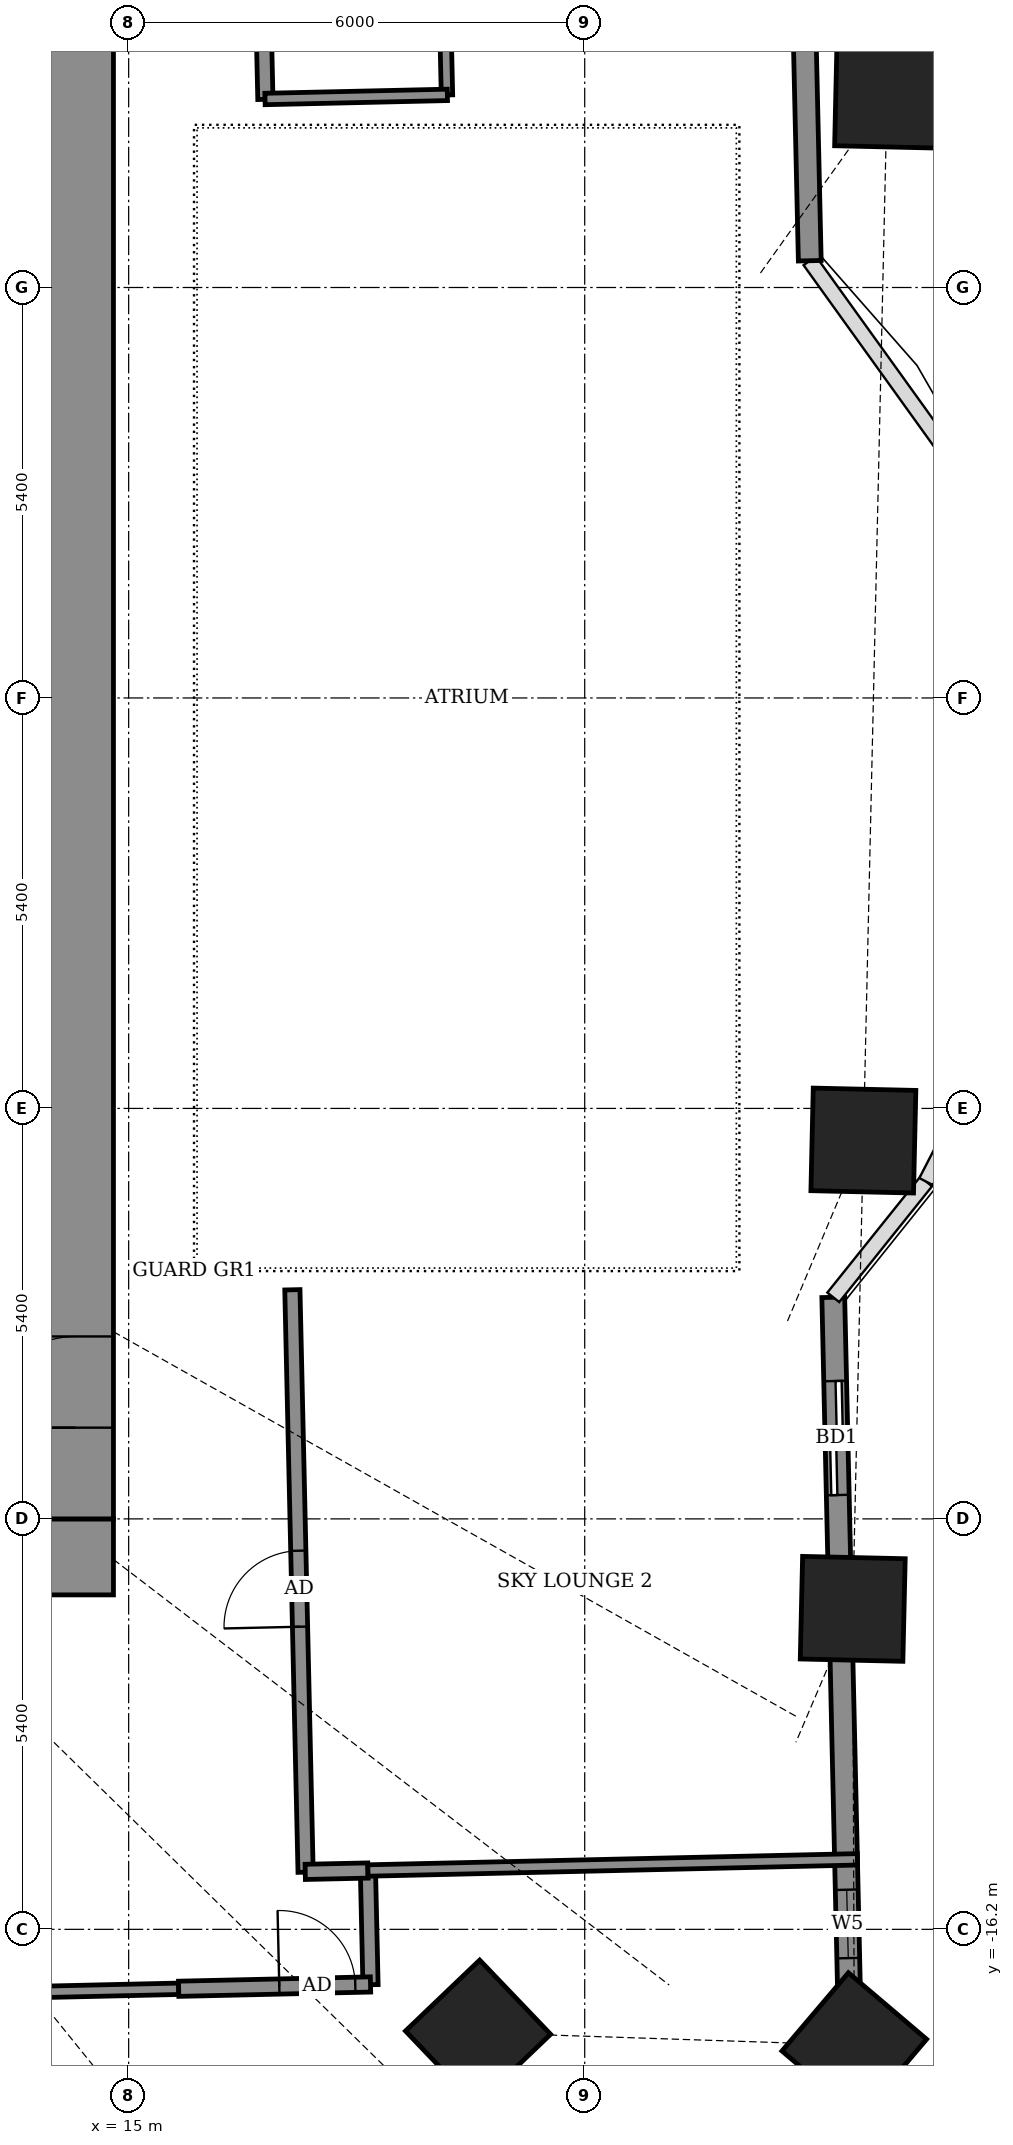
"""IFC4 building model, lengths in metres.
Left out: names, types, materials, properties, quantities, classifications, styles, units other than length and angle.
Written with IfcOpenShell. Run it as: python <this file> out.ifc"""

import sys

from ifc_helpers import new_model, si_unit, direction, frame, frame_2d, origin, origin_2d, place, context, subcontext, project, spatial, rectangle, extrude, element, fill, save


model = new_model("IFC4")
c1 = context("Model", 3, precision=1e-05, world=origin(), true_north=direction((0.0, 1.0)))
c2 = subcontext(c1, "Body", "Model", "MODEL_VIEW")
j1 = project(units=[si_unit("LENGTHUNIT", "METRE"), si_unit("PLANEANGLEUNIT", "RADIAN")], contexts=[c1])
p1 = place(None, origin())
s1 = spatial("IfcSite", under=j1, at=p1, CompositionType="ELEMENT")
p2 = place(p1, origin())
s2 = spatial("IfcBuilding", under=s1, at=p2, CompositionType="ELEMENT")
p3 = place(p2, frame((0.0, 0.0, 125.5)))
s3 = spatial("IfcBuildingStorey", under=s2, at=p3, CompositionType="ELEMENT", Elevation=125.5)
for number, where, z_axis, x_axis in (
    (1, (19.597, -17.559, -0.55), (0.0, 0.0, 1.0), (0.723, 0.691, 0.0)),
    (2, (24.547, -17.723, -0.55), (0.0, 0.0, 1.0), (0.647, 0.762, 0.0)),
    (3, (24.526, -11.984, -0.55), (0.0, 0.0, 1.0), (0.023, 1.0, 0.0)),
    (4, (24.666, -5.823, -0.55), (0.0, 0.0, 1.0), (0.023, 1.0, 0.0)),
    (5, (24.978, 7.924, -0.55), (0.0, 0.0, 1.0), (0.023, 1.0, 0.0)),
):
    element("IfcColumn", number, at=place(p3, frame(where, z_axis=z_axis, x_axis=x_axis)), inside=s3, PredefinedType="COLUMN", context=c2, shape_type="SweptSolid", body=[
        extrude(rectangle(XDim=1.35, YDim=1.35, at=origin_2d()), origin(), (0.0, 0.0, 1.0), 4.6),
    ])
p4 = place(p3, frame((24.518, -18.812, 0.0), z_axis=(0.0, 0.0, 1.0), x_axis=(-0.02269451316, 0.999742446369, 0.0)))
e6 = element("IfcWall", 6, at=p4, inside=s3, PredefinedType="SOLIDWALL", context=c2, shape_type="SweptSolid", body=[
    extrude(rectangle(XDim=10.93, YDim=0.3, at=frame_2d((5.465, 0.0))), origin(), (0.0, 0.0, 1.0), 2.65),
])
p5 = place(p4, frame((2.234, 0.0, 0.9)))
e7 = element("IfcOpeningElement", 7, at=p5, cuts=e6, PredefinedType="OPENING", context=c2, shape_type="SweptSolid", body=[
    extrude(rectangle(XDim=0.9, YDim=1.5, at=frame_2d((0.45, 0.75))), frame((0.0, 0.16, 0.0), z_axis=(0.0, -1.0, 0.0), x_axis=(1.0, 0.0, 0.0)), (0.0, 0.0, 1.0), 0.32),
])
p6 = place(p4, frame((8.328, 0.0, 0.0)))
e8 = element("IfcOpeningElement", 8, at=p6, cuts=e6, PredefinedType="OPENING", context=c2, shape_type="SweptSolid", body=[
    extrude(rectangle(XDim=1.5, YDim=2.4, at=frame_2d((0.75, 1.2))), frame((0.0, 0.16, 0.0), z_axis=(0.0, -1.0, 0.0), x_axis=(1.0, 0.0, 0.0)), (0.0, 0.0, 1.0), 0.32),
])
p7 = place(p3, frame((23.961, 5.752, 0.0), z_axis=(0.0, 0.0, 1.0), x_axis=(-0.022715362207, 0.999741972871, 0.0)))
e9 = element("IfcWall", 9, at=p7, inside=s3, PredefinedType="SOLIDWALL", context=c2, shape_type="SweptSolid", body=[
    extrude(rectangle(XDim=11.93, YDim=0.3, at=frame_2d((5.965, 0.0))), origin(), (0.0, 0.0, 1.0), 2.75),
])
p8 = place(p7, frame((4.216, 0.0, 0.0)))
e10 = element("IfcOpeningElement", 10, at=p8, cuts=e9, PredefinedType="OPENING", context=c2, shape_type="SweptSolid", body=[
    extrude(rectangle(XDim=1.5, YDim=2.4, at=frame_2d((0.75, 1.2))), frame((0.0, 0.16, 0.0), z_axis=(0.0, -1.0, 0.0), x_axis=(1.0, 0.0, 0.0)), (0.0, 0.0, 1.0), 0.32),
])
p9 = place(p7, frame((10.094, 0.0, 0.9)))
e11 = element("IfcOpeningElement", 11, at=p9, cuts=e9, PredefinedType="OPENING", context=c2, shape_type="SweptSolid", body=[
    extrude(rectangle(XDim=1.2, YDim=1.5, at=frame_2d((0.6, 0.75))), frame((0.0, 0.16, 0.0), z_axis=(0.0, -1.0, 0.0), x_axis=(1.0, 0.0, 0.0)), (0.0, 0.0, 1.0), 0.32),
])
p10 = place(p3, frame((18.182, -16.929, 0.0), z_axis=(0.0, 0.0, 1.0), x_axis=(-0.022632637625, 0.99974384905, 0.0)))
e12 = element("IfcWall", 12, at=p10, inside=s3, PredefinedType="PARTITIONING", context=c2, shape_type="SweptSolid", body=[
    extrude(rectangle(XDim=1.5, YDim=0.2, at=frame_2d((0.75, 0.0))), origin(), (0.0, 0.0, 1.0), 2.85),
])
p11 = place(p3, frame((-14.871, -17.675, 0.0), z_axis=(0.0, 0.0, 1.0), x_axis=(0.999742359486, 0.02269834024, 0.0)))
e13 = element("IfcWall", 13, at=p11, inside=s3, PredefinedType="PARTITIONING", context=c2, shape_type="SweptSolid", body=[
    extrude(rectangle(XDim=30.536, YDim=0.15, at=frame_2d((15.268, 0.0))), origin(), (0.0, 0.0, 1.0), 2.75),
])
p12 = place(p11, frame((0.784, 0.0, 0.0)))
e14 = element("IfcOpeningElement", 14, at=p12, cuts=e13, PredefinedType="OPENING", context=c2, shape_type="SweptSolid", body=[
    extrude(rectangle(XDim=1.0, YDim=2.1, at=frame_2d((0.5, 1.05))), frame((0.0, 0.085, 0.0), z_axis=(0.0, -1.0, 0.0), x_axis=(1.0, 0.0, 0.0)), (0.0, 0.0, 1.0), 0.17),
])
p13 = place(p11, frame((3.934, 0.0, 0.0)))
e15 = element("IfcOpeningElement", 15, at=p13, cuts=e13, PredefinedType="OPENING", context=c2, shape_type="SweptSolid", body=[
    extrude(rectangle(XDim=0.9, YDim=2.1, at=frame_2d((0.45, 1.05))), frame((0.0, 0.085, 0.0), z_axis=(0.0, -1.0, 0.0), x_axis=(1.0, 0.0, 0.0)), (0.0, 0.0, 1.0), 0.17),
])
p14 = place(p11, frame((11.384, 0.0, 0.0)))
e16 = element("IfcOpeningElement", 16, at=p14, cuts=e13, PredefinedType="OPENING", context=c2, shape_type="SweptSolid", body=[
    extrude(rectangle(XDim=0.9, YDim=2.1, at=frame_2d((0.45, 1.05))), frame((0.0, 0.085, 0.0), z_axis=(0.0, -1.0, 0.0), x_axis=(1.0, 0.0, 0.0)), (0.0, 0.0, 1.0), 0.17),
])
p15 = place(p11, frame((15.334, 0.0, 0.0)))
e17 = element("IfcOpeningElement", 17, at=p15, cuts=e13, PredefinedType="OPENING", context=c2, shape_type="SweptSolid", body=[
    extrude(rectangle(XDim=1.0, YDim=2.1, at=frame_2d((0.5, 1.05))), frame((0.0, 0.085, 0.0), z_axis=(0.0, -1.0, 0.0), x_axis=(1.0, 0.0, 0.0)), (0.0, 0.0, 1.0), 0.17),
])
p16 = place(p11, frame((19.259, 0.0, 0.0)))
e18 = element("IfcOpeningElement", 18, at=p16, cuts=e13, PredefinedType="OPENING", context=c2, shape_type="SweptSolid", body=[
    extrude(rectangle(XDim=0.9, YDim=2.1, at=frame_2d((0.45, 1.05))), frame((0.0, 0.085, 0.0), z_axis=(0.0, -1.0, 0.0), x_axis=(1.0, 0.0, 0.0)), (0.0, 0.0, 1.0), 0.17),
])
p17 = place(p11, frame((23.984, 0.0, 0.0)))
e19 = element("IfcOpeningElement", 19, at=p17, cuts=e13, PredefinedType="OPENING", context=c2, shape_type="SweptSolid", body=[
    extrude(rectangle(XDim=1.0, YDim=2.1, at=frame_2d((0.5, 1.05))), frame((0.0, 0.085, 0.0), z_axis=(0.0, -1.0, 0.0), x_axis=(1.0, 0.0, 0.0)), (0.0, 0.0, 1.0), 0.17),
])
p18 = place(p11, frame((21.659, 0.0, 0.0)))
e20 = element("IfcOpeningElement", 20, at=p18, cuts=e13, PredefinedType="OPENING", context=c2, shape_type="SweptSolid", body=[
    extrude(rectangle(XDim=0.9, YDim=2.1, at=frame_2d((0.45, 1.05))), frame((0.0, 0.085, 0.0), z_axis=(0.0, -1.0, 0.0), x_axis=(1.0, 0.0, 0.0)), (0.0, 0.0, 1.0), 0.17),
])
p19 = place(p11, frame((26.409, 0.0, 0.0)))
e21 = element("IfcOpeningElement", 21, at=p19, cuts=e13, PredefinedType="OPENING", context=c2, shape_type="SweptSolid", body=[
    extrude(rectangle(XDim=0.9, YDim=2.1, at=frame_2d((0.45, 1.05))), frame((0.0, 0.085, 0.0), z_axis=(0.0, -1.0, 0.0), x_axis=(1.0, 0.0, 0.0)), (0.0, 0.0, 1.0), 0.17),
])
p20 = place(p3, frame((15.658, -16.982, 0.0), z_axis=(0.0, 0.0, 1.0), x_axis=(0.9997461113, 0.022532486354, 0.0)))
e22 = element("IfcWall", 22, at=p20, inside=s3, PredefinedType="PARTITIONING", context=c2, shape_type="SweptSolid", body=[
    extrude(rectangle(XDim=2.525, YDim=0.2, at=frame_2d((1.262, 0.0))), origin(), (0.0, 0.0, 1.0), 2.85),
])
p21 = place(p20, frame((1.324, 0.0, 0.0)))
e23 = element("IfcOpeningElement", 23, at=p21, cuts=e22, PredefinedType="OPENING", context=c2, shape_type="SweptSolid", body=[
    extrude(rectangle(XDim=1.0, YDim=2.1, at=frame_2d((0.5, 1.05))), frame((0.0, 0.11, 0.0), z_axis=(0.0, -1.0, 0.0), x_axis=(1.0, 0.0, 0.0)), (0.0, 0.0, 1.0), 0.22),
])
p22 = place(p3, frame((17.328, -15.448, 0.0), z_axis=(0.0, 0.0, 1.0), x_axis=(-0.022680883318, 0.999742755679, 0.0)))
e24 = element("IfcWall", 24, at=p22, inside=s3, PredefinedType="PARTITIONING", context=c2, shape_type="SweptSolid", body=[
    extrude(rectangle(XDim=7.664, YDim=0.2, at=frame_2d((3.832, 0.0))), origin(), (0.0, 0.0, 1.0), 2.85),
])
p23 = place(p22, frame((3.23, 0.0, 0.0)))
e25 = element("IfcOpeningElement", 25, at=p23, cuts=e24, PredefinedType="OPENING", context=c2, shape_type="SweptSolid", body=[
    extrude(rectangle(XDim=1.0, YDim=2.1, at=frame_2d((0.5, 1.05))), frame((0.0, 0.11, 0.0), z_axis=(0.0, -1.0, 0.0), x_axis=(1.0, 0.0, 0.0)), (0.0, 0.0, 1.0), 0.22),
])
p24 = place(p3, frame((17.323, -15.444, 0.0), z_axis=(0.0, 0.0, 1.0), x_axis=(0.999760281873, 0.021894720586, 0.0)))
e26 = element("IfcWall", 26, at=p24, inside=s3, PredefinedType="PARTITIONING", context=c2, shape_type="SweptSolid", body=[
    extrude(rectangle(XDim=0.825, YDim=0.2, at=frame_2d((0.413, 0.0))), origin(), (0.0, 0.0, 1.0), 4.05),
])
p25 = place(p3, frame((18.148, -15.426, 0.0), z_axis=(0.0, 0.0, 1.0), x_axis=(0.999739678733, 0.022816107612, 0.0)))
e27 = element("IfcWall", 27, at=p25, inside=s3, PredefinedType="PARTITIONING", context=c2, shape_type="SweptSolid", body=[
    extrude(rectangle(XDim=6.442, YDim=0.15, at=frame_2d((3.221, 0.0))), origin(), (0.0, 0.0, 1.0), 2.65),
])
p26 = place(p3, frame((16.799, 7.875, 0.0), z_axis=(0.0, 0.0, 1.0), x_axis=(-0.022791754614, 0.999740234222, 0.0)))
e28 = element("IfcWall", 28, at=p26, inside=s3, PredefinedType="PARTITIONING", context=c2, shape_type="SweptSolid", body=[
    extrude(rectangle(XDim=5.045, YDim=0.2, at=frame_2d((2.522, 0.0))), origin(), (0.0, 0.0, 1.0), 2.75),
])
p27 = place(p26, frame((3.274, 0.0, 0.0)))
e29 = element("IfcOpeningElement", 29, at=p27, cuts=e28, PredefinedType="OPENING", context=c2, shape_type="SweptSolid", body=[
    extrude(rectangle(XDim=0.9, YDim=2.1, at=frame_2d((0.45, 1.05))), frame((0.0, 0.11, 0.0), z_axis=(0.0, -1.0, 0.0), x_axis=(1.0, 0.0, 0.0)), (0.0, 0.0, 1.0), 0.22),
])
p28 = place(p3, frame((19.188, 7.933, 0.0), z_axis=(0.0, 0.0, 1.0), x_axis=(-0.022892431828, 0.999737933943, 0.0)))
e30 = element("IfcWall", 30, at=p28, inside=s3, PredefinedType="PARTITIONING", context=c2, shape_type="SweptSolid", body=[
    extrude(rectangle(XDim=2.4, YDim=0.15, at=frame_2d((1.2, 0.0))), origin(), (0.0, 0.0, 1.0), 4.05),
])
p29 = place(p3, frame((16.794, 7.88, 0.0), z_axis=(0.0, 0.0, 1.0), x_axis=(0.999744925027, 0.022585058854, 0.0)))
e31 = element("IfcWall", 31, at=p29, inside=s3, PredefinedType="PARTITIONING", context=c2, shape_type="SweptSolid", body=[
    extrude(rectangle(XDim=2.4, YDim=0.15, at=frame_2d((1.2, 0.0))), origin(), (0.0, 0.0, 1.0), 4.05),
])
p30 = place(p3, frame((-14.8, -11.3, 0.0), z_axis=(0.0, 0.0, 1.0), x_axis=(1.0, 0.0, 0.0)))
e32 = element("IfcWall", 32, at=p30, inside=s3, PredefinedType="SHEAR", context=c2, shape_type="SweptSolid", body=[
    extrude(rectangle(XDim=29.6, YDim=1.0, at=frame_2d((14.8, 0.0))), origin(), (0.0, 0.0, 1.0), 4.6),
])
p31 = place(p3, frame((14.3, -10.8, 0.0), z_axis=(0.0, 0.0, 1.0), x_axis=(0.0, 1.0, 0.0)))
e33 = element("IfcWall", 33, at=p31, inside=s3, PredefinedType="SHEAR", context=c2, shape_type="SweptSolid", body=[
    extrude(rectangle(XDim=21.6, YDim=1.0, at=frame_2d((10.8, 0.0))), origin(), (0.0, 0.0, 1.0), 4.6),
])
p32 = place(p31, frame((1.2, 0.0, 0.0)))
e34 = element("IfcOpeningElement", 34, at=p32, cuts=e33, PredefinedType="OPENING", context=c2, shape_type="SweptSolid", body=[
    extrude(rectangle(XDim=1.2, YDim=2.1, at=frame_2d((0.6, 1.05))), frame((0.0, 0.51, 0.0), z_axis=(0.0, -1.0, 0.0), x_axis=(1.0, 0.0, 0.0)), (0.0, 0.0, 1.0), 1.02),
])
p33 = place(p5, origin())
e35 = element("IfcWindow", 35, at=p33, inside=s3, PartitioningType="SINGLE_PANEL", PredefinedType="WINDOW", context=c2, shape_type="SweptSolid", body=[
    extrude(rectangle(XDim=0.9, YDim=1.5, at=frame_2d((0.45, 0.75))), frame((0.0, 0.03, 0.0), z_axis=(0.0, -1.0, 0.0), x_axis=(1.0, 0.0, 0.0)), (0.0, 0.0, 1.0), 0.06),
])
fill(e7, e35)
p34 = place(p6, origin())
e36 = element("IfcDoor", 36, at=p34, inside=s3, OperationType="SLIDING_TO_LEFT", PredefinedType="DOOR", context=c2, shape_type="SweptSolid", body=[
    extrude(rectangle(XDim=1.5, YDim=2.4, at=frame_2d((0.75, 1.2))), frame((0.0, 0.025, 0.0), z_axis=(0.0, -1.0, 0.0), x_axis=(1.0, 0.0, 0.0)), (0.0, 0.0, 1.0), 0.05),
])
fill(e8, e36)
p35 = place(p21, origin())
e37 = element("IfcDoor", 37, at=p35, inside=s3, OperationType="SINGLE_SWING_LEFT", PredefinedType="DOOR", context=c2, shape_type="SweptSolid", body=[
    extrude(rectangle(XDim=1.0, YDim=2.1, at=frame_2d((0.5, 1.05))), frame((0.0, 0.025, 0.0), z_axis=(0.0, -1.0, 0.0), x_axis=(1.0, 0.0, 0.0)), (0.0, 0.0, 1.0), 0.05),
])
fill(e23, e37)
p36 = place(p23, origin())
e38 = element("IfcDoor", 38, at=p36, inside=s3, OperationType="SINGLE_SWING_RIGHT", PredefinedType="DOOR", context=c2, shape_type="SweptSolid", body=[
    extrude(rectangle(XDim=1.0, YDim=2.1, at=frame_2d((0.5, 1.05))), frame((0.0, 0.025, 0.0), z_axis=(0.0, -1.0, 0.0), x_axis=(1.0, 0.0, 0.0)), (0.0, 0.0, 1.0), 0.05),
])
fill(e25, e38)
p37 = place(p32, origin())
e39 = element("IfcDoor", 39, at=p37, inside=s3, OperationType="DOUBLE_DOOR_SINGLE_SWING", PredefinedType="DOOR", context=c2, shape_type="SweptSolid", body=[
    extrude(rectangle(XDim=1.2, YDim=2.1, at=frame_2d((0.6, 1.05))), frame((0.0, 0.025, 0.0), z_axis=(0.0, -1.0, 0.0), x_axis=(1.0, 0.0, 0.0)), (0.0, 0.0, 1.0), 0.05),
])
fill(e34, e39)
save(model, sys.argv[1])
